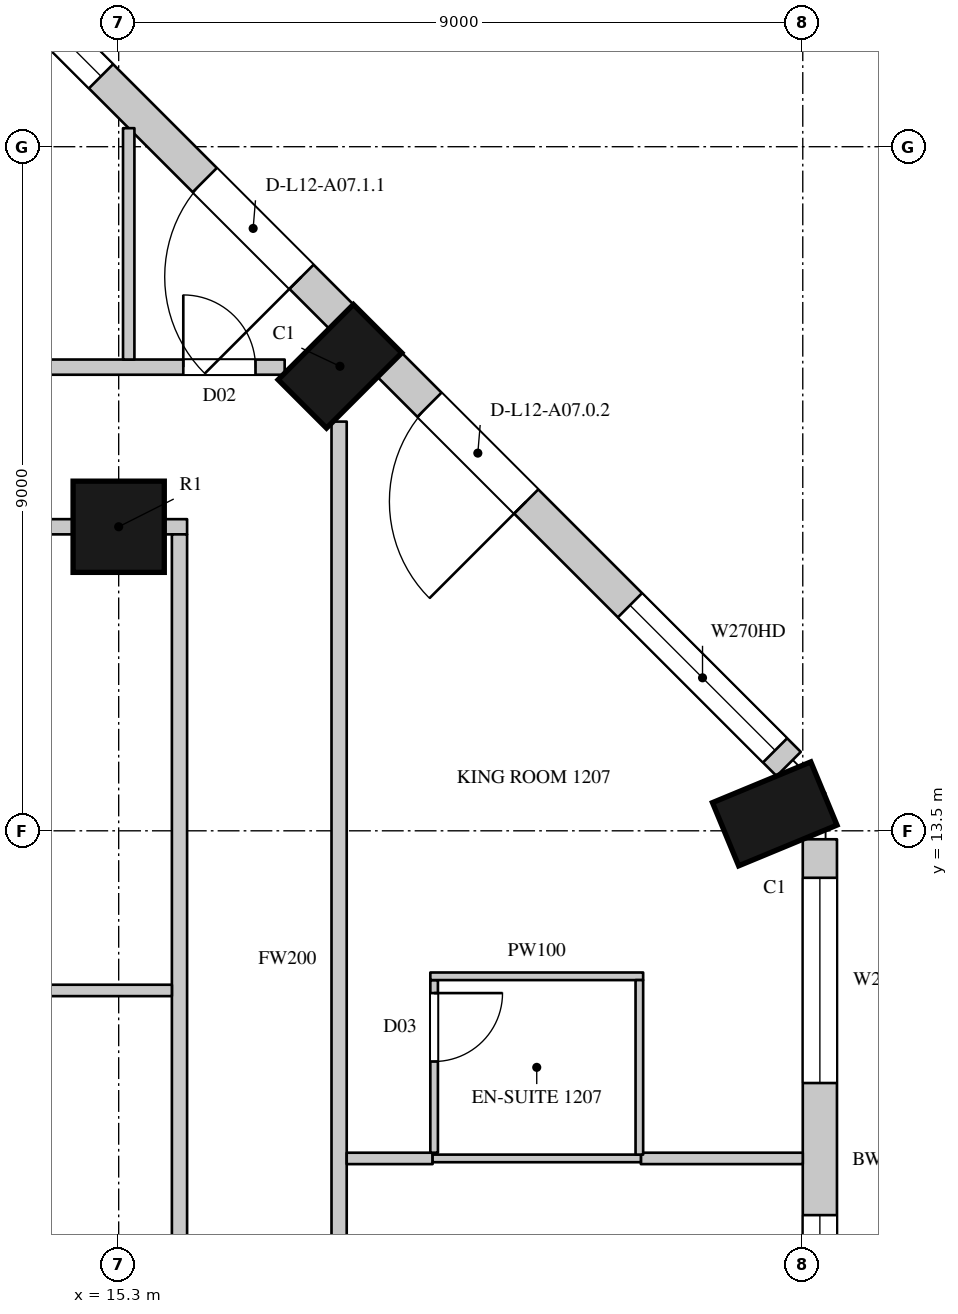
"""IFC4 building model, lengths in metres.
Left out: names, types, materials, properties, quantities, classifications, styles, units other than length and angle.
Written with IfcOpenShell. Run it as: python <this file> out.ifc"""

import sys

from ifc_helpers import new_model, si_unit, direction, frame, frame_2d, origin, origin_2d, place, context, subcontext, project, spatial, rectangle, circle, extrude, element, fill, save


model = new_model("IFC4")
c1 = context("Model", 3, precision=1e-05, world=origin(), true_north=direction((0.0, 1.0)))
c2 = subcontext(c1, "Body", "Model", "MODEL_VIEW")
j1 = project(units=[si_unit("LENGTHUNIT", "METRE"), si_unit("PLANEANGLEUNIT", "RADIAN")], contexts=[c1])
p1 = place(None, origin())
s1 = spatial("IfcSite", under=j1, at=p1, CompositionType="ELEMENT")
p2 = place(p1, origin())
s2 = spatial("IfcBuilding", under=s1, at=p2, CompositionType="ELEMENT")
p3 = place(p2, frame((0.0, 0.0, 73.5)))
s3 = spatial("IfcBuildingStorey", under=s2, at=p3, CompositionType="ELEMENT", Elevation=73.5)
for number, where, z_axis, x_axis in (
    (1, (23.931, 13.723, 0.0), (0.0, 0.0, 1.0), (-0.383, 0.924, 0.0)),
    (2, (18.211, 19.611, 0.0), (0.0, 0.0, 1.0), (-0.707, 0.707, 0.0)),
):
    element("IfcColumn", number, at=place(p3, frame(where, z_axis=z_axis, x_axis=x_axis)), inside=s3, PredefinedType="COLUMN", context=c2, shape_type="SweptSolid", body=[
        extrude(rectangle(XDim=0.9, YDim=1.4, at=origin_2d()), origin(), (0.0, 0.0, 1.0), 3.6),
    ])
p4 = place(p3, frame((15.3, 17.5, 0.0), z_axis=(0.0, 0.0, 1.0), x_axis=(1.0, 0.0, 0.0)))
e3 = element("IfcColumn", 3, at=p4, inside=s3, PredefinedType="COLUMN", context=c2, shape_type="SweptSolid", body=[
    extrude(circle(Radius=0.6, at=origin_2d()), origin(), (0.0, 0.0, 1.0), 3.6),
])
p5 = place(p3, frame((24.525, 4.95, 0.0), z_axis=(0.0, 0.0, 1.0), x_axis=(0.0, 1.0, 0.0)))
e4 = element("IfcWall", 4, at=p5, inside=s3, PredefinedType="SOLIDWALL", context=c2, shape_type="SweptSolid", body=[
    extrude(rectangle(XDim=8.439, YDim=0.45, at=frame_2d((4.219, 0.0))), origin(), (0.0, 0.0, 1.0), 3.3),
])
p6 = place(p5, frame((0.294, 0.0, 0.0)))
e5 = element("IfcOpeningElement", 5, at=p6, cuts=e4, PredefinedType="OPENING", context=c2, shape_type="SweptSolid", body=[
    extrude(rectangle(XDim=1.8, YDim=2.4, at=frame_2d((0.9, 1.2))), frame((0.0, 0.235, 0.0), z_axis=(0.0, -1.0, 0.0), x_axis=(1.0, 0.0, 0.0)), (0.0, 0.0, 1.0), 0.47),
])
p7 = place(p5, frame((2.294, 0.0, 1.05)))
e6 = element("IfcOpeningElement", 6, at=p7, cuts=e4, PredefinedType="OPENING", context=c2, shape_type="SweptSolid", body=[
    extrude(rectangle(XDim=1.2, YDim=2.0, at=frame_2d((0.6, 1.0))), frame((0.0, 0.235, 0.0), z_axis=(0.0, -1.0, 0.0), x_axis=(1.0, 0.0, 0.0)), (0.0, 0.0, 1.0), 0.47),
])
p8 = place(p5, frame((5.232, 0.0, 1.05)))
e7 = element("IfcOpeningElement", 7, at=p8, cuts=e4, PredefinedType="OPENING", context=c2, shape_type="SweptSolid", body=[
    extrude(rectangle(XDim=2.7, YDim=2.0, at=frame_2d((1.35, 1.0))), frame((0.0, 0.235, 0.0), z_axis=(0.0, -1.0, 0.0), x_axis=(1.0, 0.0, 0.0)), (0.0, 0.0, 1.0), 0.47),
])
p9 = place(p3, frame((24.115, 14.379, 0.0), z_axis=(0.0, 0.0, 1.0), x_axis=(-0.707106781187, 0.707106781187, 0.0)))
e8 = element("IfcWall", 8, at=p9, inside=s3, PredefinedType="SOLIDWALL", context=c2, shape_type="SweptSolid", body=[
    extrude(rectangle(XDim=7.424, YDim=0.45, at=frame_2d((3.712, 0.0))), origin(), (0.0, 0.0, 1.0), 3.3),
])
p10 = place(p9, frame((0.253, 0.0, 1.05)))
e9 = element("IfcOpeningElement", 9, at=p10, cuts=e8, PredefinedType="OPENING", context=c2, shape_type="SweptSolid", body=[
    extrude(rectangle(XDim=2.7, YDim=2.0, at=frame_2d((1.35, 1.0))), frame((0.0, 0.235, 0.0), z_axis=(0.0, -1.0, 0.0), x_axis=(1.0, 0.0, 0.0)), (0.0, 0.0, 1.0), 0.47),
])
p11 = place(p9, frame((4.884, 0.0, 0.0)))
e10 = element("IfcOpeningElement", 10, at=p11, cuts=e8, PredefinedType="OPENING", context=c2, shape_type="SweptSolid", body=[
    extrude(rectangle(XDim=1.8, YDim=2.4, at=frame_2d((0.9, 1.2))), frame((0.0, 0.235, 0.0), z_axis=(0.0, -1.0, 0.0), x_axis=(1.0, 0.0, 0.0)), (0.0, 0.0, 1.0), 0.47),
])
p12 = place(p3, frame((18.229, 20.265, 0.0), z_axis=(0.0, 0.0, 1.0), x_axis=(-0.707106781187, 0.707106781187, 0.0)))
e11 = element("IfcWall", 11, at=p12, inside=s3, PredefinedType="SOLIDWALL", context=c2, shape_type="SweptSolid", body=[
    extrude(rectangle(XDim=7.424, YDim=0.45, at=frame_2d((3.712, 0.0))), origin(), (0.0, 0.0, 1.0), 3.3),
])
p13 = place(p12, frame((0.74, 0.0, 0.0)))
e12 = element("IfcOpeningElement", 12, at=p13, cuts=e11, PredefinedType="OPENING", context=c2, shape_type="SweptSolid", body=[
    extrude(rectangle(XDim=1.8, YDim=2.4, at=frame_2d((0.9, 1.2))), frame((0.0, 0.235, 0.0), z_axis=(0.0, -1.0, 0.0), x_axis=(1.0, 0.0, 0.0)), (0.0, 0.0, 1.0), 0.47),
])
p14 = place(p12, frame((4.471, 0.0, 1.05)))
e13 = element("IfcOpeningElement", 13, at=p14, cuts=e11, PredefinedType="OPENING", context=c2, shape_type="SweptSolid", body=[
    extrude(rectangle(XDim=2.7, YDim=2.0, at=frame_2d((1.35, 1.0))), frame((0.0, 0.235, 0.0), z_axis=(0.0, -1.0, 0.0), x_axis=(1.0, 0.0, 0.0)), (0.0, 0.0, 1.0), 0.47),
])
p15 = place(p3, frame((23.15, 16.864, 0.0), z_axis=(0.0, 0.0, 1.0), x_axis=(-0.707106781187, 0.707106781187, 0.0)))
e14 = element("IfcWall", 14, at=p15, inside=s3, PredefinedType="SOLIDWALL", context=c2, shape_type="SweptSolid", body=[
    extrude(rectangle(XDim=1.445, YDim=0.45, at=frame_2d((0.722, 0.0))), origin(), (0.0, 0.0, 1.0), 0.6),
])
p16 = place(p3, frame((19.937, 20.078, 0.0), z_axis=(0.0, 0.0, 1.0), x_axis=(-0.707106781187, 0.707106781187, 0.0)))
e15 = element("IfcWall", 15, at=p16, inside=s3, PredefinedType="SOLIDWALL", context=c2, shape_type="SweptSolid", body=[
    extrude(rectangle(XDim=1.781, YDim=0.45, at=frame_2d((0.89, 0.0))), origin(), (0.0, 0.0, 1.0), 0.6),
])
p17 = place(p3, frame((16.486, 23.529, 0.0), z_axis=(0.0, 0.0, 1.0), x_axis=(-0.707022305137, 0.707191247145, 0.0)))
e16 = element("IfcWall", 16, at=p17, inside=s3, PredefinedType="SOLIDWALL", context=c2, shape_type="SweptSolid", body=[
    extrude(rectangle(XDim=1.445, YDim=0.45, at=frame_2d((0.723, 0.0))), origin(), (0.0, 0.0, 1.0), 0.6),
])
p18 = place(p3, frame((-20.7, 19.6, 0.0), z_axis=(0.0, 0.0, 1.0), x_axis=(1.0, 0.0, 0.0)))
e17 = element("IfcWall", 17, at=p18, inside=s3, PredefinedType="PARTITIONING", context=c2, shape_type="SweptSolid", body=[
    extrude(rectangle(XDim=38.184, YDim=0.2, at=frame_2d((19.092, 0.0))), origin(), (0.0, 0.0, 1.0), 3.3),
])
p19 = place(p18, frame((3.15, 0.0, 0.0)))
e18 = element("IfcOpeningElement", 18, at=p19, cuts=e17, PredefinedType="OPENING", context=c2, shape_type="SweptSolid", body=[
    extrude(rectangle(XDim=0.95, YDim=2.2, at=frame_2d((0.475, 1.1))), frame((0.0, 0.11, 0.0), z_axis=(0.0, -1.0, 0.0), x_axis=(1.0, 0.0, 0.0)), (0.0, 0.0, 1.0), 0.22),
])
p20 = place(p18, frame((13.9, 0.0, 0.0)))
e19 = element("IfcOpeningElement", 19, at=p20, cuts=e17, PredefinedType="OPENING", context=c2, shape_type="SweptSolid", body=[
    extrude(rectangle(XDim=0.95, YDim=2.2, at=frame_2d((0.475, 1.1))), frame((0.0, 0.11, 0.0), z_axis=(0.0, -1.0, 0.0), x_axis=(1.0, 0.0, 0.0)), (0.0, 0.0, 1.0), 0.22),
])
p21 = place(p18, frame((21.15, 0.0, 0.0)))
e20 = element("IfcOpeningElement", 20, at=p21, cuts=e17, PredefinedType="OPENING", context=c2, shape_type="SweptSolid", body=[
    extrude(rectangle(XDim=0.95, YDim=2.2, at=frame_2d((0.475, 1.1))), frame((0.0, 0.11, 0.0), z_axis=(0.0, -1.0, 0.0), x_axis=(1.0, 0.0, 0.0)), (0.0, 0.0, 1.0), 0.22),
])
p22 = place(p18, frame((31.9, 0.0, 0.0)))
e21 = element("IfcOpeningElement", 21, at=p22, cuts=e17, PredefinedType="OPENING", context=c2, shape_type="SweptSolid", body=[
    extrude(rectangle(XDim=0.95, YDim=2.2, at=frame_2d((0.475, 1.1))), frame((0.0, 0.11, 0.0), z_axis=(0.0, -1.0, 0.0), x_axis=(1.0, 0.0, 0.0)), (0.0, 0.0, 1.0), 0.22),
])
p23 = place(p18, frame((36.85, 0.0, 0.0)))
e22 = element("IfcOpeningElement", 22, at=p23, cuts=e17, PredefinedType="OPENING", context=c2, shape_type="SweptSolid", body=[
    extrude(rectangle(XDim=0.95, YDim=2.2, at=frame_2d((0.475, 1.1))), frame((0.0, 0.11, 0.0), z_axis=(0.0, -1.0, 0.0), x_axis=(1.0, 0.0, 0.0)), (0.0, 0.0, 1.0), 0.22),
])
p24 = place(p3, frame((6.9, 17.5, 0.0), z_axis=(0.0, 0.0, 1.0), x_axis=(1.0, 0.0, 0.0)))
e23 = element("IfcWall", 23, at=p24, inside=s3, PredefinedType="PARTITIONING", context=c2, shape_type="SweptSolid", body=[
    extrude(rectangle(XDim=7.8, YDim=0.2, at=frame_2d((3.9, 0.0))), origin(), (0.0, 0.0, 1.0), 2.75),
])
p25 = place(p24, frame((3.45, 0.0, 0.0)))
e24 = element("IfcOpeningElement", 24, at=p25, cuts=e23, PredefinedType="OPENING", context=c2, shape_type="SweptSolid", body=[
    extrude(rectangle(XDim=0.95, YDim=2.2, at=frame_2d((0.475, 1.1))), frame((0.0, 0.11, 0.0), z_axis=(0.0, -1.0, 0.0), x_axis=(1.0, 0.0, 0.0)), (0.0, 0.0, 1.0), 0.22),
])
p26 = place(p3, frame((15.9, 17.5, 0.0), z_axis=(0.0, 0.0, 1.0), x_axis=(1.0, 0.0, 0.0)))
e25 = element("IfcWall", 25, at=p26, inside=s3, PredefinedType="PARTITIONING", context=c2, shape_type="SweptSolid", body=[
    extrude(rectangle(XDim=0.3, YDim=0.2, at=frame_2d((0.15, 0.0))), origin(), (0.0, 0.0, 1.0), 3.3),
])
p27 = place(p3, frame((16.1, 6.825, 0.0), z_axis=(0.0, 0.0, 1.0), x_axis=(0.0, 1.0, 0.0)))
e26 = element("IfcWall", 26, at=p27, inside=s3, PredefinedType="PARTITIONING", context=c2, shape_type="SweptSolid", body=[
    extrude(rectangle(XDim=10.575, YDim=0.2, at=frame_2d((5.288, 0.0))), origin(), (0.0, 0.0, 1.0), 3.3),
])
p28 = place(p3, frame((18.2, 4.75, 0.0), z_axis=(0.0, 0.0, 1.0), x_axis=(0.0, 1.0, 0.0)))
e27 = element("IfcWall", 27, at=p28, inside=s3, PredefinedType="PARTITIONING", context=c2, shape_type="SweptSolid", body=[
    extrude(rectangle(XDim=14.134, YDim=0.2, at=frame_2d((7.067, 0.0))), origin(), (0.0, 0.0, 1.0), 3.3),
])
p29 = place(p28, frame((1.7, 0.0, 0.0)))
e28 = element("IfcOpeningElement", 28, at=p29, cuts=e27, PredefinedType="OPENING", context=c2, shape_type="SweptSolid", body=[
    extrude(rectangle(XDim=0.9, YDim=2.2, at=frame_2d((0.45, 1.1))), frame((0.0, 0.11, 0.0), z_axis=(0.0, -1.0, 0.0), x_axis=(1.0, 0.0, 0.0)), (0.0, 0.0, 1.0), 0.22),
])
p30 = place(p3, frame((10.4, 11.4, 0.0), z_axis=(0.0, 0.0, 1.0), x_axis=(1.0, 0.0, 0.0)))
e29 = element("IfcWall", 29, at=p30, inside=s3, PredefinedType="PARTITIONING", context=c2, shape_type="SweptSolid", body=[
    extrude(rectangle(XDim=5.6, YDim=0.15, at=frame_2d((2.8, 0.0))), origin(), (0.0, 0.0, 1.0), 3.3),
])
p31 = place(p3, frame((15.432, 19.7, 0.0), z_axis=(0.0, 0.0, 1.0), x_axis=(0.0, 1.0, 0.0)))
e30 = element("IfcWall", 30, at=p31, inside=s3, PredefinedType="PARTITIONING", context=c2, shape_type="SweptSolid", body=[
    extrude(rectangle(XDim=3.044, YDim=0.15, at=frame_2d((1.522, 0.0))), origin(), (0.0, 0.0, 1.0), 3.3),
])
p32 = place(p3, frame((18.3, 9.19, 0.0), z_axis=(0.0, 0.0, 1.0), x_axis=(1.0, 0.0, 0.0)))
e31 = element("IfcWall", 31, at=p32, inside=s3, PredefinedType="PARTITIONING", context=c2, shape_type="SweptSolid", body=[
    extrude(rectangle(XDim=1.13, YDim=0.15, at=frame_2d((0.565, 0.0))), origin(), (0.0, 0.0, 1.0), 2.65),
])
p33 = place(p3, frame((22.17, 9.19, 0.0), z_axis=(0.0, 0.0, 1.0), x_axis=(1.0, 0.0, 0.0)))
e32 = element("IfcWall", 32, at=p33, inside=s3, PredefinedType="PARTITIONING", context=c2, shape_type="SweptSolid", body=[
    extrude(rectangle(XDim=2.13, YDim=0.15, at=frame_2d((1.065, 0.0))), origin(), (0.0, 0.0, 1.0), 2.65),
])
p34 = place(p3, frame((19.43, 9.19, 0.0), z_axis=(0.0, 0.0, 1.0), x_axis=(1.0, 0.0, 0.0)))
e33 = element("IfcWall", 33, at=p34, inside=s3, PredefinedType="PARTITIONING", context=c2, shape_type="SweptSolid", body=[
    extrude(rectangle(XDim=2.74, YDim=0.1, at=frame_2d((1.37, 0.0))), origin(), (0.0, 0.0, 1.0), 2.65),
])
p35 = place(p3, frame((19.45, 9.265, 0.0), z_axis=(0.0, 0.0, 1.0), x_axis=(0.0, 1.0, 0.0)))
e34 = element("IfcWall", 34, at=p35, inside=s3, PredefinedType="PARTITIONING", context=c2, shape_type="SweptSolid", body=[
    extrude(rectangle(XDim=2.271, YDim=0.1, at=frame_2d((1.135, 0.0))), origin(), (0.0, 0.0, 1.0), 3.3),
])
p36 = place(p35, frame((1.2, 0.0, 0.0)))
e35 = element("IfcOpeningElement", 35, at=p36, cuts=e34, PredefinedType="OPENING", context=c2, shape_type="SweptSolid", body=[
    extrude(rectangle(XDim=0.9, YDim=2.2, at=frame_2d((0.45, 1.1))), frame((0.0, 0.06, 0.0), z_axis=(0.0, -1.0, 0.0), x_axis=(1.0, 0.0, 0.0)), (0.0, 0.0, 1.0), 0.12),
])
p37 = place(p3, frame((19.4, 11.586, 0.0), z_axis=(0.0, 0.0, 1.0), x_axis=(1.0, 0.0, 0.0)))
e36 = element("IfcWall", 36, at=p37, inside=s3, PredefinedType="PARTITIONING", context=c2, shape_type="SweptSolid", body=[
    extrude(rectangle(XDim=2.8, YDim=0.1, at=frame_2d((1.4, 0.0))), origin(), (0.0, 0.0, 1.0), 3.3),
])
p38 = place(p3, frame((22.15, 9.24, 0.0), z_axis=(0.0, 0.0, 1.0), x_axis=(0.0, 1.0, 0.0)))
e37 = element("IfcWall", 37, at=p38, inside=s3, PredefinedType="PARTITIONING", context=c2, shape_type="SweptSolid", body=[
    extrude(rectangle(XDim=2.296, YDim=0.1, at=frame_2d((1.148, 0.0))), origin(), (0.0, 0.0, 1.0), 3.3),
])
p39 = place(p7, origin())
e38 = element("IfcWindow", 38, at=p39, inside=s3, PartitioningType="SINGLE_PANEL", PredefinedType="WINDOW", context=c2, shape_type="SweptSolid", body=[
    extrude(rectangle(XDim=1.2, YDim=2.0, at=frame_2d((0.6, 1.0))), frame((0.0, 0.135, 0.0), z_axis=(0.0, -1.0, 0.0), x_axis=(1.0, 0.0, 0.0)), (0.0, 0.0, 1.0), 0.06),
])
fill(e6, e38)
p40 = place(p8, origin())
e39 = element("IfcWindow", 39, at=p40, inside=s3, PartitioningType="SINGLE_PANEL", PredefinedType="WINDOW", context=c2, shape_type="SweptSolid", body=[
    extrude(rectangle(XDim=2.7, YDim=2.0, at=frame_2d((1.35, 1.0))), frame((0.0, 0.135, 0.0), z_axis=(0.0, -1.0, 0.0), x_axis=(1.0, 0.0, 0.0)), (0.0, 0.0, 1.0), 0.06),
])
fill(e7, e39)
p41 = place(p10, origin())
e40 = element("IfcWindow", 40, at=p41, inside=s3, PartitioningType="SINGLE_PANEL", PredefinedType="WINDOW", context=c2, shape_type="SweptSolid", body=[
    extrude(rectangle(XDim=2.7, YDim=2.0, at=frame_2d((1.35, 1.0))), frame((0.0, 0.135, 0.0), z_axis=(0.0, -1.0, 0.0), x_axis=(1.0, 0.0, 0.0)), (0.0, 0.0, 1.0), 0.06),
])
fill(e9, e40)
p42 = place(p11, origin())
e41 = element("IfcDoor", 41, at=p42, inside=s3, OperationType="SLIDING_TO_LEFT", PredefinedType="DOOR", context=c2, shape_type="SweptSolid", body=[
    extrude(rectangle(XDim=1.8, YDim=2.4, at=frame_2d((0.9, 1.2))), frame((0.0, 0.13, 0.0), z_axis=(0.0, -1.0, 0.0), x_axis=(1.0, 0.0, 0.0)), (0.0, 0.0, 1.0), 0.05),
])
fill(e10, e41)
p43 = place(p13, origin())
e42 = element("IfcDoor", 42, at=p43, inside=s3, OperationType="SLIDING_TO_LEFT", PredefinedType="DOOR", context=c2, shape_type="SweptSolid", body=[
    extrude(rectangle(XDim=1.8, YDim=2.4, at=frame_2d((0.9, 1.2))), frame((0.0, 0.13, 0.0), z_axis=(0.0, -1.0, 0.0), x_axis=(1.0, 0.0, 0.0)), (0.0, 0.0, 1.0), 0.05),
])
fill(e12, e42)
p44 = place(p14, origin())
e43 = element("IfcWindow", 43, at=p44, inside=s3, PartitioningType="SINGLE_PANEL", PredefinedType="WINDOW", context=c2, shape_type="SweptSolid", body=[
    extrude(rectangle(XDim=2.7, YDim=2.0, at=frame_2d((1.35, 1.0))), frame((0.0, 0.135, 0.0), z_axis=(0.0, -1.0, 0.0), x_axis=(1.0, 0.0, 0.0)), (0.0, 0.0, 1.0), 0.06),
])
fill(e13, e43)
p45 = place(p23, origin())
e44 = element("IfcDoor", 44, at=p45, inside=s3, OperationType="SINGLE_SWING_LEFT", PredefinedType="DOOR", context=c2, shape_type="SweptSolid", body=[
    extrude(rectangle(XDim=0.95, YDim=2.2, at=frame_2d((0.475, 1.1))), frame((0.0, 0.025, 0.0), z_axis=(0.0, -1.0, 0.0), x_axis=(1.0, 0.0, 0.0)), (0.0, 0.0, 1.0), 0.05),
])
fill(e22, e44)
p46 = place(p36, origin())
e45 = element("IfcDoor", 45, at=p46, inside=s3, OperationType="SINGLE_SWING_LEFT", PredefinedType="DOOR", context=c2, shape_type="SweptSolid", body=[
    extrude(rectangle(XDim=0.9, YDim=2.2, at=frame_2d((0.45, 1.1))), frame((0.0, 0.025, 0.0), z_axis=(0.0, -1.0, 0.0), x_axis=(1.0, 0.0, 0.0)), (0.0, 0.0, 1.0), 0.05),
])
fill(e35, e45)
save(model, sys.argv[1])
